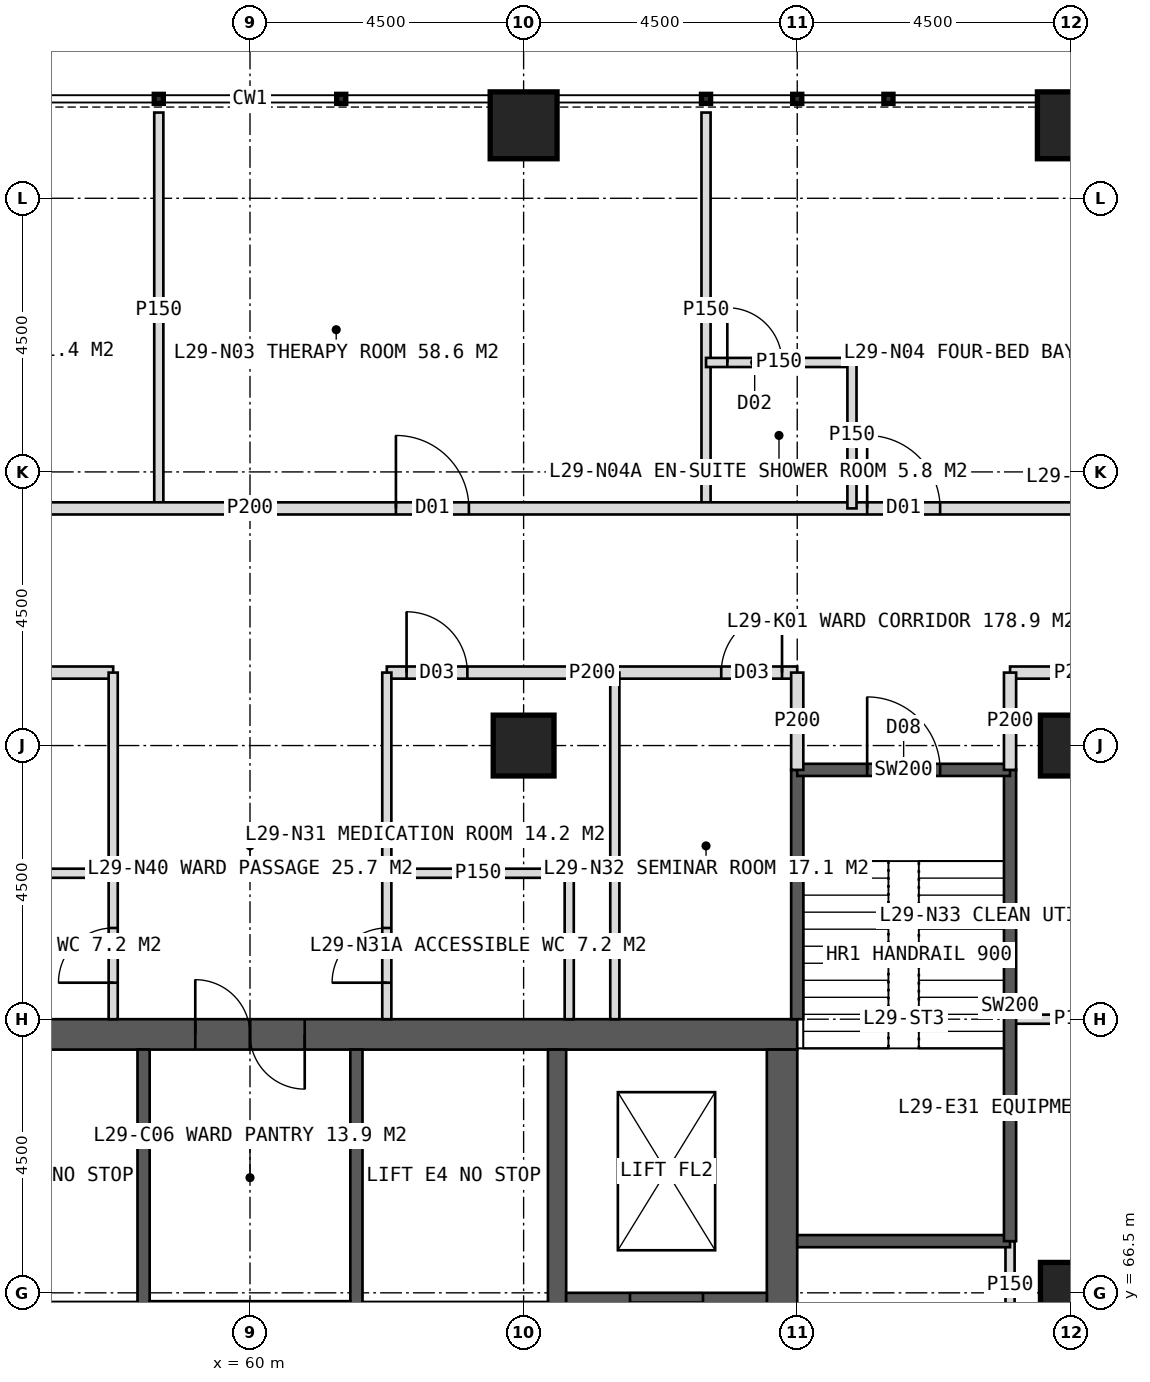
"""IFC4 building model, lengths in metres.
Left out: names, types, materials, properties, quantities, classifications, styles, units other than length and angle.
Written with IfcOpenShell. Run it as: python <this file> out.ifc"""

import sys

from ifc_helpers import new_model, si_unit, direction, frame, frame_2d, origin, origin_2d, place, context, subcontext, project, spatial, rectangle, hollow_rectangle, extrude, element, fill, save


model = new_model("IFC4")
c1 = context("Model", 3, precision=1e-05, world=origin(), true_north=direction((0.0, 1.0)))
c2 = subcontext(c1, "Body", "Model", "MODEL_VIEW")
j1 = project(units=[si_unit("LENGTHUNIT", "METRE"), si_unit("PLANEANGLEUNIT", "RADIAN")], contexts=[c1])
p1 = place(None, origin())
s1 = spatial("IfcSite", under=j1, at=p1, CompositionType="ELEMENT")
p2 = place(p1, origin())
s2 = spatial("IfcBuilding", under=s1, at=p2, CompositionType="ELEMENT")
p3 = place(p2, frame((0.0, 0.0, 124.0)))
s3 = spatial("IfcBuildingStorey", under=s2, at=p3, CompositionType="ELEMENT", Elevation=124.0)
p4 = place(p3, frame((51.0, 70.75, 0.0), z_axis=(0.0, 0.0, 1.0), x_axis=(1.0, 0.0, 0.0)))
e1 = element("IfcWall", 1, at=p4, inside=s3, PredefinedType="SHEAR", context=c2, shape_type="SweptSolid", body=[
    extrude(rectangle(XDim=18.0, YDim=0.5, at=frame_2d((9.0, 0.0))), origin(), (0.0, 0.0, 1.0), 4.0),
])
p5 = place(p4, frame((8.1, 0.0, 0.0)))
e2 = element("IfcOpeningElement", 2, at=p5, cuts=e1, PredefinedType="OPENING", context=c2, shape_type="SweptSolid", body=[
    extrude(rectangle(XDim=1.8, YDim=2.2, at=frame_2d((0.9, 1.1))), frame((0.0, 0.26, 0.0), z_axis=(0.0, -1.0, 0.0), x_axis=(1.0, 0.0, 0.0)), (0.0, 0.0, 1.0), 0.52),
])
p6 = place(p3, frame((68.75, 53.5, 0.0), z_axis=(0.0, 0.0, 1.0), x_axis=(0.0, 1.0, 0.0)))
e3 = element("IfcWall", 3, at=p6, inside=s3, PredefinedType="SHEAR", context=c2, shape_type="SweptSolid", body=[
    extrude(rectangle(XDim=17.0, YDim=0.5, at=frame_2d((8.5, 0.0))), origin(), (0.0, 0.0, 1.0), 4.0),
])
p7 = place(p6, frame((9.5, 0.0, 0.0)))
e4 = element("IfcOpeningElement", 4, at=p7, cuts=e3, PredefinedType="OPENING", context=c2, shape_type="SweptSolid", body=[
    extrude(rectangle(XDim=1.5, YDim=2.2, at=frame_2d((0.75, 1.1))), frame((0.0, 0.26, 0.0), z_axis=(0.0, -1.0, 0.0), x_axis=(1.0, 0.0, 0.0)), (0.0, 0.0, 1.0), 0.52),
])
p8 = place(p3, frame((65.05, 53.5, 0.0), z_axis=(0.0, 0.0, 1.0), x_axis=(0.0, 1.0, 0.0)))
e5 = element("IfcWall", 5, at=p8, inside=s3, PredefinedType="SHEAR", context=c2, shape_type="SweptSolid", body=[
    extrude(rectangle(XDim=17.0, YDim=0.3, at=frame_2d((8.5, 0.0))), origin(), (0.0, 0.0, 1.0), 4.0),
])
p9 = place(p3, frame((58.25, 53.5, 0.0), z_axis=(0.0, 0.0, 1.0), x_axis=(0.0, 1.0, 0.0)))
e6 = element("IfcWall", 6, at=p9, inside=s3, PredefinedType="SHEAR", context=c2, shape_type="SweptSolid", body=[
    extrude(rectangle(XDim=17.0, YDim=0.2, at=frame_2d((8.5, 0.0))), origin(), (0.0, 0.0, 1.0), 4.0),
])
p10 = place(p9, frame((1.375, 0.0, 0.0)))
e7 = element("IfcOpeningElement", 7, at=p10, cuts=e6, PredefinedType="OPENING", context=c2, shape_type="SweptSolid", body=[
    extrude(rectangle(XDim=1.4, YDim=2.2, at=frame_2d((0.7, 1.1))), frame((0.0, 0.11, 0.0), z_axis=(0.0, -1.0, 0.0), x_axis=(1.0, 0.0, 0.0)), (0.0, 0.0, 1.0), 0.22),
])
p11 = place(p9, frame((5.675, 0.0, 0.0)))
e8 = element("IfcOpeningElement", 8, at=p11, cuts=e6, PredefinedType="OPENING", context=c2, shape_type="SweptSolid", body=[
    extrude(rectangle(XDim=1.4, YDim=2.2, at=frame_2d((0.7, 1.1))), frame((0.0, 0.11, 0.0), z_axis=(0.0, -1.0, 0.0), x_axis=(1.0, 0.0, 0.0)), (0.0, 0.0, 1.0), 0.22),
])
p12 = place(p3, frame((61.75, 53.5, 0.0), z_axis=(0.0, 0.0, 1.0), x_axis=(0.0, 1.0, 0.0)))
e9 = element("IfcWall", 9, at=p12, inside=s3, PredefinedType="SHEAR", context=c2, shape_type="SweptSolid", body=[
    extrude(rectangle(XDim=17.0, YDim=0.2, at=frame_2d((8.5, 0.0))), origin(), (0.0, 0.0, 1.0), 4.0),
])
p13 = place(p12, frame((1.375, 0.0, 0.0)))
e10 = element("IfcOpeningElement", 10, at=p13, cuts=e9, PredefinedType="OPENING", context=c2, shape_type="SweptSolid", body=[
    extrude(rectangle(XDim=1.4, YDim=2.2, at=frame_2d((0.7, 1.1))), frame((0.0, 0.11, 0.0), z_axis=(0.0, -1.0, 0.0), x_axis=(1.0, 0.0, 0.0)), (0.0, 0.0, 1.0), 0.22),
])
p14 = place(p12, frame((5.675, 0.0, 0.0)))
e11 = element("IfcOpeningElement", 11, at=p14, cuts=e9, PredefinedType="OPENING", context=c2, shape_type="SweptSolid", body=[
    extrude(rectangle(XDim=1.4, YDim=2.2, at=frame_2d((0.7, 1.1))), frame((0.0, 0.11, 0.0), z_axis=(0.0, -1.0, 0.0), x_axis=(1.0, 0.0, 0.0)), (0.0, 0.0, 1.0), 0.22),
])
p15 = place(p3, frame((65.2, 66.35, 0.0), z_axis=(0.0, 0.0, 1.0), x_axis=(1.0, 0.0, 0.0)))
e12 = element("IfcWall", 12, at=p15, inside=s3, PredefinedType="SHEAR", context=c2, shape_type="SweptSolid", body=[
    extrude(rectangle(XDim=3.3, YDim=0.3, at=frame_2d((1.65, 0.0))), origin(), (0.0, 0.0, 1.0), 4.0),
])
p16 = place(p15, frame((1.05, 0.0, 0.0)))
e13 = element("IfcOpeningElement", 13, at=p16, cuts=e12, PredefinedType="OPENING", context=c2, shape_type="SweptSolid", body=[
    extrude(rectangle(XDim=1.2, YDim=2.2, at=frame_2d((0.6, 1.1))), frame((0.0, 0.16, 0.0), z_axis=(0.0, -1.0, 0.0), x_axis=(1.0, 0.0, 0.0)), (0.0, 0.0, 1.0), 0.32),
])
for number, where, z_axis, x_axis in (
    (14, (73.5, 75.5, 0.0), (0.0, 0.0, 1.0), (1.0, 0.0, 0.0)),
    (15, (64.5, 75.5, 0.0), (0.0, 0.0, 1.0), (1.0, 0.0, 0.0)),
    (16, (73.5, 66.5, 0.0), (0.0, 0.0, 1.0), (1.0, 0.0, 0.0)),
):
    element("IfcColumn", number, at=place(p3, frame(where, z_axis=z_axis, x_axis=x_axis)), inside=s3, PredefinedType="COLUMN", context=c2, shape_type="SweptSolid", body=[
        extrude(hollow_rectangle(XDim=1.0, YDim=1.0, WallThickness=0.1, at=origin_2d()), origin(), (0.0, 0.0, 1.0), 4.0),
    ])
for number, where, z_axis, x_axis in (
    (17, (64.5, 85.7, 0.0), (0.0, 0.0, 1.0), (1.0, 0.0, 0.0)),
    (18, (73.5, 85.7, 0.0), (0.0, 0.0, 1.0), (1.0, 0.0, 0.0)),
):
    element("IfcColumn", number, at=place(p3, frame(where, z_axis=z_axis, x_axis=x_axis)), inside=s3, PredefinedType="COLUMN", context=c2, shape_type="SweptSolid", body=[
        extrude(hollow_rectangle(XDim=1.1, YDim=1.1, WallThickness=0.1, at=origin_2d()), origin(), (0.0, 0.0, 1.0), 4.0),
    ])
for number, where, z_axis, x_axis in (
    (19, (58.5, 79.4, 0.0), (0.0, 0.0, 1.0), (0.0, 1.0, 0.0)),
    (20, (67.5, 79.4, 0.0), (0.0, 0.0, 1.0), (0.0, 1.0, 0.0)),
):
    element("IfcWall", number, at=place(p3, frame(where, z_axis=z_axis, x_axis=x_axis)), inside=s3, PredefinedType="PARTITIONING", context=c2, shape_type="SweptSolid", body=[
        extrude(rectangle(XDim=6.51, YDim=0.15, at=frame_2d((3.255, 0.0))), origin(), (0.0, 0.0, 1.0), 3.75),
    ])
p17 = place(p3, frame((42.6, 79.4, 0.0), z_axis=(0.0, 0.0, 1.0), x_axis=(1.0, 0.0, 0.0)))
e21 = element("IfcWall", 21, at=p17, inside=s3, PredefinedType="PARTITIONING", context=c2, shape_type="SweptSolid", body=[
    extrude(rectangle(XDim=34.8, YDim=0.2, at=frame_2d((17.4, 0.0))), origin(), (0.0, 0.0, 1.0), 3.75),
])
p18 = place(p17, frame((2.45, 0.0, 0.0)))
e22 = element("IfcOpeningElement", 22, at=p18, cuts=e21, PredefinedType="OPENING", context=c2, shape_type="SweptSolid", body=[
    extrude(rectangle(XDim=1.2, YDim=2.2, at=frame_2d((0.6, 1.1))), frame((0.0, 0.11, 0.0), z_axis=(0.0, -1.0, 0.0), x_axis=(1.0, 0.0, 0.0)), (0.0, 0.0, 1.0), 0.22),
])
p19 = place(p17, frame((10.15, 0.0, 0.0)))
e23 = element("IfcOpeningElement", 23, at=p19, cuts=e21, PredefinedType="OPENING", context=c2, shape_type="SweptSolid", body=[
    extrude(rectangle(XDim=1.2, YDim=2.2, at=frame_2d((0.6, 1.1))), frame((0.0, 0.11, 0.0), z_axis=(0.0, -1.0, 0.0), x_axis=(1.0, 0.0, 0.0)), (0.0, 0.0, 1.0), 0.22),
])
p20 = place(p17, frame((19.8, 0.0, 0.0)))
e24 = element("IfcOpeningElement", 24, at=p20, cuts=e21, PredefinedType="OPENING", context=c2, shape_type="SweptSolid", body=[
    extrude(rectangle(XDim=1.2, YDim=2.2, at=frame_2d((0.6, 1.1))), frame((0.0, 0.11, 0.0), z_axis=(0.0, -1.0, 0.0), x_axis=(1.0, 0.0, 0.0)), (0.0, 0.0, 1.0), 0.22),
])
p21 = place(p17, frame((27.55, 0.0, 0.0)))
e25 = element("IfcOpeningElement", 25, at=p21, cuts=e21, PredefinedType="OPENING", context=c2, shape_type="SweptSolid", body=[
    extrude(rectangle(XDim=1.2, YDim=2.2, at=frame_2d((0.6, 1.1))), frame((0.0, 0.11, 0.0), z_axis=(0.0, -1.0, 0.0), x_axis=(1.0, 0.0, 0.0)), (0.0, 0.0, 1.0), 0.22),
])
p22 = place(p3, frame((67.5, 81.8, 0.0), z_axis=(0.0, 0.0, 1.0), x_axis=(1.0, 0.0, 0.0)))
e26 = element("IfcWall", 26, at=p22, inside=s3, PredefinedType="PARTITIONING", context=c2, shape_type="SweptSolid", body=[
    extrude(rectangle(XDim=2.4, YDim=0.15, at=frame_2d((1.2, 0.0))), origin(), (0.0, 0.0, 1.0), 3.75),
])
p23 = place(p22, frame((0.35, 0.0, 0.0)))
e27 = element("IfcOpeningElement", 27, at=p23, cuts=e26, PredefinedType="OPENING", context=c2, shape_type="SweptSolid", body=[
    extrude(rectangle(XDim=0.9, YDim=2.1, at=frame_2d((0.45, 1.05))), frame((0.0, 0.085, 0.0), z_axis=(0.0, -1.0, 0.0), x_axis=(1.0, 0.0, 0.0)), (0.0, 0.0, 1.0), 0.17),
])
p24 = place(p3, frame((69.9, 79.4, 0.0), z_axis=(0.0, 0.0, 1.0), x_axis=(0.0, 1.0, 0.0)))
e28 = element("IfcWall", 28, at=p24, inside=s3, PredefinedType="PARTITIONING", context=c2, shape_type="SweptSolid", body=[
    extrude(rectangle(XDim=2.4, YDim=0.15, at=frame_2d((1.2, 0.0))), origin(), (0.0, 0.0, 1.0), 3.75),
])
p25 = place(p3, frame((45.3, 76.7, 0.0), z_axis=(0.0, 0.0, 1.0), x_axis=(1.0, 0.0, 0.0)))
e29 = element("IfcWall", 29, at=p25, inside=s3, PredefinedType="PARTITIONING", context=c2, shape_type="SweptSolid", body=[
    extrude(rectangle(XDim=12.45, YDim=0.2, at=frame_2d((6.225, 0.0))), origin(), (0.0, 0.0, 1.0), 3.75),
])
p26 = place(p25, frame((7.15, 0.0, 0.0)))
e30 = element("IfcOpeningElement", 30, at=p26, cuts=e29, PredefinedType="OPENING", context=c2, shape_type="SweptSolid", body=[
    extrude(rectangle(XDim=1.0, YDim=2.1, at=frame_2d((0.5, 1.05))), frame((0.0, 0.11, 0.0), z_axis=(0.0, -1.0, 0.0), x_axis=(1.0, 0.0, 0.0)), (0.0, 0.0, 1.0), 0.22),
])
p27 = place(p3, frame((62.25, 76.7, 0.0), z_axis=(0.0, 0.0, 1.0), x_axis=(1.0, 0.0, 0.0)))
e31 = element("IfcWall", 31, at=p27, inside=s3, PredefinedType="PARTITIONING", context=c2, shape_type="SweptSolid", body=[
    extrude(rectangle(XDim=6.75, YDim=0.2, at=frame_2d((3.375, 0.0))), origin(), (0.0, 0.0, 1.0), 3.75),
])
p28 = place(p27, frame((0.325, 0.0, 0.0)))
e32 = element("IfcOpeningElement", 32, at=p28, cuts=e31, PredefinedType="OPENING", context=c2, shape_type="SweptSolid", body=[
    extrude(rectangle(XDim=1.0, YDim=2.1, at=frame_2d((0.5, 1.05))), frame((0.0, 0.11, 0.0), z_axis=(0.0, -1.0, 0.0), x_axis=(1.0, 0.0, 0.0)), (0.0, 0.0, 1.0), 0.22),
])
p29 = place(p27, frame((5.5, 0.0, 0.0)))
e33 = element("IfcOpeningElement", 33, at=p29, cuts=e31, PredefinedType="OPENING", context=c2, shape_type="SweptSolid", body=[
    extrude(rectangle(XDim=1.0, YDim=2.1, at=frame_2d((0.5, 1.05))), frame((0.0, 0.11, 0.0), z_axis=(0.0, -1.0, 0.0), x_axis=(1.0, 0.0, 0.0)), (0.0, 0.0, 1.0), 0.22),
])
p30 = place(p3, frame((72.5, 76.7, 0.0), z_axis=(0.0, 0.0, 1.0), x_axis=(1.0, 0.0, 0.0)))
e34 = element("IfcWall", 34, at=p30, inside=s3, PredefinedType="PARTITIONING", context=c2, shape_type="SweptSolid", body=[
    extrude(rectangle(XDim=2.2, YDim=0.2, at=frame_2d((1.1, 0.0))), origin(), (0.0, 0.0, 1.0), 3.75),
])
p31 = place(p3, frame((57.75, 71.0, 0.0), z_axis=(0.0, 0.0, 1.0), x_axis=(0.0, 1.0, 0.0)))
e35 = element("IfcWall", 35, at=p31, inside=s3, PredefinedType="PARTITIONING", context=c2, shape_type="SweptSolid", body=[
    extrude(rectangle(XDim=5.7, YDim=0.15, at=frame_2d((2.85, 0.0))), origin(), (0.0, 0.0, 1.0), 3.75),
])
p32 = place(p31, frame((0.6, 0.0, 0.0)))
e36 = element("IfcOpeningElement", 36, at=p32, cuts=e35, PredefinedType="OPENING", context=c2, shape_type="SweptSolid", body=[
    extrude(rectangle(XDim=0.9, YDim=2.1, at=frame_2d((0.45, 1.05))), frame((0.0, 0.085, 0.0), z_axis=(0.0, -1.0, 0.0), x_axis=(1.0, 0.0, 0.0)), (0.0, 0.0, 1.0), 0.17),
])
p33 = place(p3, frame((62.25, 71.0, 0.0), z_axis=(0.0, 0.0, 1.0), x_axis=(0.0, 1.0, 0.0)))
e37 = element("IfcWall", 37, at=p33, inside=s3, PredefinedType="PARTITIONING", context=c2, shape_type="SweptSolid", body=[
    extrude(rectangle(XDim=5.7, YDim=0.15, at=frame_2d((2.85, 0.0))), origin(), (0.0, 0.0, 1.0), 3.75),
])
p34 = place(p33, frame((0.6, 0.0, 0.0)))
e38 = element("IfcOpeningElement", 38, at=p34, cuts=e37, PredefinedType="OPENING", context=c2, shape_type="SweptSolid", body=[
    extrude(rectangle(XDim=0.9, YDim=2.1, at=frame_2d((0.45, 1.05))), frame((0.0, 0.085, 0.0), z_axis=(0.0, -1.0, 0.0), x_axis=(1.0, 0.0, 0.0)), (0.0, 0.0, 1.0), 0.17),
])
p35 = place(p3, frame((66.0, 71.0, 0.0), z_axis=(0.0, 0.0, 1.0), x_axis=(0.0, 1.0, 0.0)))
e39 = element("IfcWall", 39, at=p35, inside=s3, PredefinedType="PARTITIONING", context=c2, shape_type="SweptSolid", body=[
    extrude(rectangle(XDim=5.7, YDim=0.15, at=frame_2d((2.85, 0.0))), origin(), (0.0, 0.0, 1.0), 3.75),
])
for number, where, z_axis, x_axis in (
    (40, (54.75, 73.4, 0.0), (0.0, 0.0, 1.0), (1.0, 0.0, 0.0)),
    (41, (62.25, 73.4, 0.0), (0.0, 0.0, 1.0), (1.0, 0.0, 0.0)),
):
    element("IfcWall", number, at=place(p3, frame(where, z_axis=z_axis, x_axis=x_axis)), inside=s3, PredefinedType="PARTITIONING", context=c2, shape_type="SweptSolid", body=[
        extrude(rectangle(XDim=3.0, YDim=0.15, at=frame_2d((1.5, 0.0))), origin(), (0.0, 0.0, 1.0), 3.75),
    ])
p36 = place(p3, frame((65.25, 71.0, 0.0), z_axis=(0.0, 0.0, 1.0), x_axis=(0.0, 1.0, 0.0)))
e42 = element("IfcWall", 42, at=p36, inside=s3, PredefinedType="PARTITIONING", context=c2, shape_type="SweptSolid", body=[
    extrude(rectangle(XDim=2.4, YDim=0.15, at=frame_2d((1.2, 0.0))), origin(), (0.0, 0.0, 1.0), 3.75),
])
p37 = place(p3, frame((72.5, 71.0, 0.0), z_axis=(0.0, 0.0, 1.0), x_axis=(1.0, 0.0, 0.0)))
e43 = element("IfcWall", 43, at=p37, inside=s3, PredefinedType="PARTITIONING", context=c2, shape_type="SweptSolid", body=[
    extrude(rectangle(XDim=2.2, YDim=0.15, at=frame_2d((1.1, 0.0))), origin(), (0.0, 0.0, 1.0), 3.75),
])
p38 = place(p3, frame((58.35, 66.288, 0.0), z_axis=(0.0, 0.0, 1.0), x_axis=(1.0, 0.0, 0.0)))
e44 = element("IfcWall", 44, at=p38, inside=s3, PredefinedType="PARTITIONING", context=c2, shape_type="SweptSolid", body=[
    extrude(rectangle(XDim=3.3, YDim=0.15, at=frame_2d((1.65, 0.0))), origin(), (0.0, 0.0, 1.0), 3.75),
])
p39 = place(p3, frame((72.5, 65.9, 0.0), z_axis=(0.0, 0.0, 1.0), x_axis=(0.0, 1.0, 0.0)))
e45 = element("IfcWall", 45, at=p39, inside=s3, PredefinedType="PARTITIONING", context=c2, shape_type="SweptSolid", body=[
    extrude(rectangle(XDim=1.45, YDim=0.15, at=frame_2d((0.725, 0.0))), origin(), (0.0, 0.0, 1.0), 3.75),
])
p40 = place(p3, frame((69.0, 71.0, 0.0), z_axis=(0.0, 0.0, 1.0), x_axis=(0.0, 1.0, 0.0)))
e46 = element("IfcWall", 46, at=p40, inside=s3, PredefinedType="SOLIDWALL", context=c2, shape_type="SweptSolid", body=[
    extrude(rectangle(XDim=4.1, YDim=0.2, at=frame_2d((2.05, 0.0))), origin(), (0.0, 0.0, 1.0), 3.75),
])
p41 = place(p3, frame((69.0, 67.35, 0.0), z_axis=(0.0, 0.0, 1.0), x_axis=(1.0, 0.0, 0.0)))
e47 = element("IfcWall", 47, at=p41, inside=s3, PredefinedType="SOLIDWALL", context=c2, shape_type="SweptSolid", body=[
    extrude(rectangle(XDim=3.5, YDim=0.2, at=frame_2d((1.75, 0.0))), origin(), (0.0, 0.0, 1.0), 3.75),
])
p42 = place(p3, frame((72.5, 67.35, 0.0), z_axis=(0.0, 0.0, 1.0), x_axis=(0.0, 1.0, 0.0)))
e48 = element("IfcWall", 48, at=p42, inside=s3, PredefinedType="SOLIDWALL", context=c2, shape_type="SweptSolid", body=[
    extrude(rectangle(XDim=7.75, YDim=0.2, at=frame_2d((3.875, 0.0))), origin(), (0.0, 0.0, 1.0), 3.75),
])
p43 = place(p3, frame((69.0, 75.1, 0.0), z_axis=(0.0, 0.0, 1.0), x_axis=(1.0, 0.0, 0.0)))
e49 = element("IfcWall", 49, at=p43, inside=s3, PredefinedType="SOLIDWALL", context=c2, shape_type="SweptSolid", body=[
    extrude(rectangle(XDim=3.5, YDim=0.2, at=frame_2d((1.75, 0.0))), origin(), (0.0, 0.0, 1.0), 3.75),
])
p44 = place(p43, frame((1.15, 0.0, 0.0)))
e50 = element("IfcOpeningElement", 50, at=p44, cuts=e49, PredefinedType="OPENING", context=c2, shape_type="SweptSolid", body=[
    extrude(rectangle(XDim=1.2, YDim=2.1, at=frame_2d((0.6, 1.05))), frame((0.0, 0.11, 0.0), z_axis=(0.0, -1.0, 0.0), x_axis=(1.0, 0.0, 0.0)), (0.0, 0.0, 1.0), 0.22),
])
for number, where, z_axis, x_axis in (
    (51, (69.0, 75.1, 0.0), (0.0, 0.0, 1.0), (0.0, 1.0, 0.0)),
    (52, (72.5, 75.1, 0.0), (0.0, 0.0, 1.0), (0.0, 1.0, 0.0)),
):
    element("IfcWall", number, at=place(p3, frame(where, z_axis=z_axis, x_axis=x_axis)), inside=s3, PredefinedType="PARTITIONING", context=c2, shape_type="SweptSolid", body=[
        extrude(rectangle(XDim=1.6, YDim=0.2, at=frame_2d((0.8, 0.0))), origin(), (0.0, 0.0, 1.0), 3.75),
    ])
p45 = place(p20, origin())
e53 = element("IfcDoor", 53, at=p45, inside=s3, OperationType="SINGLE_SWING_LEFT", PredefinedType="DOOR", context=c2, shape_type="SweptSolid", body=[
    extrude(rectangle(XDim=1.2, YDim=2.2, at=frame_2d((0.6, 1.1))), frame((0.0, 0.025, 0.0), z_axis=(0.0, -1.0, 0.0), x_axis=(1.0, 0.0, 0.0)), (0.0, 0.0, 1.0), 0.05),
])
fill(e24, e53)
p46 = place(p21, origin())
e54 = element("IfcDoor", 54, at=p46, inside=s3, OperationType="SINGLE_SWING_LEFT", PredefinedType="DOOR", context=c2, shape_type="SweptSolid", body=[
    extrude(rectangle(XDim=1.2, YDim=2.2, at=frame_2d((0.6, 1.1))), frame((0.0, 0.025, 0.0), z_axis=(0.0, -1.0, 0.0), x_axis=(1.0, 0.0, 0.0)), (0.0, 0.0, 1.0), 0.05),
])
fill(e25, e54)
p47 = place(p23, origin())
e55 = element("IfcDoor", 55, at=p47, inside=s3, OperationType="SINGLE_SWING_LEFT", PredefinedType="DOOR", context=c2, shape_type="SweptSolid", body=[
    extrude(rectangle(XDim=0.9, YDim=2.1, at=frame_2d((0.45, 1.05))), frame((0.0, 0.025, 0.0), z_axis=(0.0, -1.0, 0.0), x_axis=(1.0, 0.0, 0.0)), (0.0, 0.0, 1.0), 0.05),
])
fill(e27, e55)
p48 = place(p32, origin())
e56 = element("IfcDoor", 56, at=p48, inside=s3, OperationType="SINGLE_SWING_LEFT", PredefinedType="DOOR", context=c2, shape_type="SweptSolid", body=[
    extrude(rectangle(XDim=0.9, YDim=2.1, at=frame_2d((0.45, 1.05))), frame((0.0, 0.025, 0.0), z_axis=(0.0, -1.0, 0.0), x_axis=(1.0, 0.0, 0.0)), (0.0, 0.0, 1.0), 0.05),
])
fill(e36, e56)
p49 = place(p34, origin())
e57 = element("IfcDoor", 57, at=p49, inside=s3, OperationType="SINGLE_SWING_LEFT", PredefinedType="DOOR", context=c2, shape_type="SweptSolid", body=[
    extrude(rectangle(XDim=0.9, YDim=2.1, at=frame_2d((0.45, 1.05))), frame((0.0, 0.025, 0.0), z_axis=(0.0, -1.0, 0.0), x_axis=(1.0, 0.0, 0.0)), (0.0, 0.0, 1.0), 0.05),
])
fill(e38, e57)
p50 = place(p28, origin())
e58 = element("IfcDoor", 58, at=p50, inside=s3, OperationType="SINGLE_SWING_LEFT", PredefinedType="DOOR", context=c2, shape_type="SweptSolid", body=[
    extrude(rectangle(XDim=1.0, YDim=2.1, at=frame_2d((0.5, 1.05))), frame((0.0, 0.025, 0.0), z_axis=(0.0, -1.0, 0.0), x_axis=(1.0, 0.0, 0.0)), (0.0, 0.0, 1.0), 0.05),
])
fill(e32, e58)
p51 = place(p29, origin())
e59 = element("IfcDoor", 59, at=p51, inside=s3, OperationType="SINGLE_SWING_RIGHT", PredefinedType="DOOR", context=c2, shape_type="SweptSolid", body=[
    extrude(rectangle(XDim=1.0, YDim=2.1, at=frame_2d((0.5, 1.05))), frame((0.0, 0.025, 0.0), z_axis=(0.0, -1.0, 0.0), x_axis=(1.0, 0.0, 0.0)), (0.0, 0.0, 1.0), 0.05),
])
fill(e33, e59)
p52 = place(p16, origin())
e60 = element("IfcDoor", 60, at=p52, inside=s3, OperationType="SLIDING_TO_LEFT", PredefinedType="DOOR", context=c2, shape_type="SweptSolid", body=[
    extrude(rectangle(XDim=1.2, YDim=2.2, at=frame_2d((0.6, 1.1))), frame((0.0, 0.025, 0.0), z_axis=(0.0, -1.0, 0.0), x_axis=(1.0, 0.0, 0.0)), (0.0, 0.0, 1.0), 0.05),
])
fill(e13, e60)
p53 = place(p5, origin())
e61 = element("IfcDoor", 61, at=p53, inside=s3, OperationType="DOUBLE_DOOR_SINGLE_SWING", PredefinedType="DOOR", context=c2, shape_type="SweptSolid", body=[
    extrude(rectangle(XDim=1.8, YDim=2.2, at=frame_2d((0.9, 1.1))), frame((0.0, 0.025, 0.0), z_axis=(0.0, -1.0, 0.0), x_axis=(1.0, 0.0, 0.0)), (0.0, 0.0, 1.0), 0.05),
])
fill(e2, e61)
p54 = place(p44, origin())
e62 = element("IfcDoor", 62, at=p54, inside=s3, OperationType="SINGLE_SWING_LEFT", PredefinedType="DOOR", context=c2, shape_type="SweptSolid", body=[
    extrude(rectangle(XDim=1.2, YDim=2.1, at=frame_2d((0.6, 1.05))), frame((0.0, 0.025, 0.0), z_axis=(0.0, -1.0, 0.0), x_axis=(1.0, 0.0, 0.0)), (0.0, 0.0, 1.0), 0.05),
])
fill(e50, e62)
save(model, sys.argv[1])
